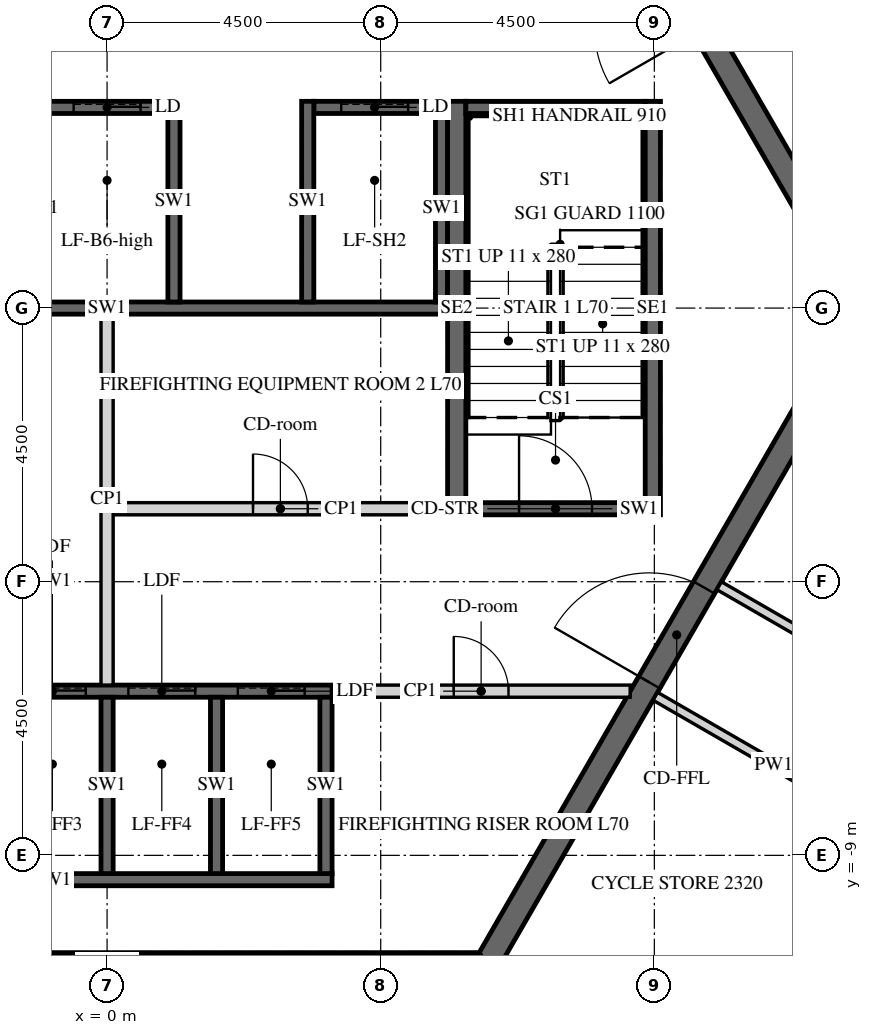
"""IFC4 building model, lengths in metres.
Left out: names, types, materials, properties, quantities, classifications, styles, units other than length and angle.
Written with IfcOpenShell. Run it as: python <this file> out.ifc"""

import sys

from ifc_helpers import new_model, si_unit, direction, frame, frame_2d, origin, place, context, subcontext, project, spatial, polyline, rectangle, outline, extrude, element, fill, save


model = new_model("IFC4")
c1 = context("Model", 3, precision=1e-05, world=origin(), true_north=direction((0.0, 1.0)))
c2 = subcontext(c1, "Body", "Model", "MODEL_VIEW")
j1 = project(units=[si_unit("LENGTHUNIT", "METRE"), si_unit("PLANEANGLEUNIT", "RADIAN")], contexts=[c1])
p1 = place(None, origin())
s1 = spatial("IfcSite", under=j1, at=p1, CompositionType="ELEMENT")
p2 = place(p1, origin())
s2 = spatial("IfcBuilding", under=s1, at=p2, CompositionType="ELEMENT")
p3 = place(p2, frame((0.0, 0.0, 291.3)))
s3 = spatial("IfcBuildingStorey", under=s2, at=p3, CompositionType="ELEMENT", Elevation=291.3)
p4 = place(p3, frame((-6.235, -10.8, -0.15), z_axis=(0.0, 0.0, 1.0), x_axis=(1.0, 0.0, 0.0)))
e1 = element("IfcWall", 1, at=p4, inside=s3, PredefinedType="SHEAR", context=c2, shape_type="SweptSolid", body=[
    extrude(outline(polyline([(-0.115, -0.2), (12.586, -0.2), (12.355, 0.2), (0.115, 0.2), (-0.115, -0.2)])), origin(), (0.0, 0.0, 1.0), 3.9),
])
p5 = place(p3, frame((6.235, -10.8, -0.15), z_axis=(0.0, 0.0, 1.0), x_axis=(0.499996419489, 0.866027470984, 0.0)))
e2 = element("IfcWall", 2, at=p5, inside=s3, PredefinedType="SHEAR", context=c2, shape_type="SweptSolid", body=[
    extrude(outline(polyline([(-0.115, -0.2), (12.586, -0.2), (12.355, 0.2), (0.115, 0.2), (-0.115, -0.2)])), origin(), (0.0, 0.0, 1.0), 3.9),
])
p6 = place(p5, frame((5.364, 0.0, 0.15)))
e3 = element("IfcOpeningElement", 3, at=p6, cuts=e2, PredefinedType="OPENING", context=c2, shape_type="SweptSolid", body=[
    extrude(rectangle(XDim=1.8, YDim=2.4, at=frame_2d((0.9, 1.2))), frame((0.0, 0.21, 0.0), z_axis=(0.0, -1.0, 0.0), x_axis=(1.0, 0.0, 0.0)), (0.0, 0.0, 1.0), 0.42),
])
p7 = place(p3, frame((12.471, 0.0, -0.15), z_axis=(0.0, 0.0, 1.0), x_axis=(-0.499996419489, 0.866027470984, 0.0)))
e4 = element("IfcWall", 4, at=p7, inside=s3, PredefinedType="SHEAR", context=c2, shape_type="SweptSolid", body=[
    extrude(outline(polyline([(-0.115, -0.2), (12.586, -0.2), (12.355, 0.2), (0.115, 0.2), (-0.115, -0.2)])), origin(), (0.0, 0.0, 1.0), 3.9),
])
p8 = place(p7, frame((5.306, 0.0, 0.15)))
e5 = element("IfcOpeningElement", 5, at=p8, cuts=e4, PredefinedType="OPENING", context=c2, shape_type="SweptSolid", body=[
    extrude(rectangle(XDim=1.8, YDim=2.4, at=frame_2d((0.9, 1.2))), frame((0.0, 0.21, 0.0), z_axis=(0.0, -1.0, 0.0), x_axis=(1.0, 0.0, 0.0)), (0.0, 0.0, 1.0), 0.42),
])
p9 = place(p3, frame((-5.6, 3.3, -0.25), z_axis=(0.0, 0.0, 1.0), x_axis=(1.0, 0.0, 0.0)))
e6 = element("IfcWall", 6, at=p9, inside=s3, PredefinedType="SHEAR", context=c2, shape_type="SweptSolid", body=[
    extrude(rectangle(XDim=6.6, YDim=0.2, at=frame_2d((3.3, 0.0))), origin(), (0.0, 0.0, 1.0), 3.9),
])
p10 = place(p9, frame((0.65, 0.0, 0.25)))
e7 = element("IfcOpeningElement", 7, at=p10, cuts=e6, PredefinedType="OPENING", context=c2, shape_type="SweptSolid", body=[
    extrude(rectangle(XDim=1.1, YDim=2.1, at=frame_2d((0.55, 1.05))), frame((0.0, 0.11, 0.0), z_axis=(0.0, -1.0, 0.0), x_axis=(1.0, 0.0, 0.0)), (0.0, 0.0, 1.0), 0.22),
])
p11 = place(p9, frame((2.85, 0.0, 0.25)))
e8 = element("IfcOpeningElement", 8, at=p11, cuts=e6, PredefinedType="OPENING", context=c2, shape_type="SweptSolid", body=[
    extrude(rectangle(XDim=1.1, YDim=2.1, at=frame_2d((0.55, 1.05))), frame((0.0, 0.11, 0.0), z_axis=(0.0, -1.0, 0.0), x_axis=(1.0, 0.0, 0.0)), (0.0, 0.0, 1.0), 0.22),
])
p12 = place(p9, frame((5.05, 0.0, 0.25)))
e9 = element("IfcOpeningElement", 9, at=p12, cuts=e6, PredefinedType="OPENING", context=c2, shape_type="SweptSolid", body=[
    extrude(rectangle(XDim=1.1, YDim=2.1, at=frame_2d((0.55, 1.05))), frame((0.0, 0.11, 0.0), z_axis=(0.0, -1.0, 0.0), x_axis=(1.0, 0.0, 0.0)), (0.0, 0.0, 1.0), 0.22),
])
p13 = place(p3, frame((3.4, 3.3, -0.25), z_axis=(0.0, 0.0, 1.0), x_axis=(1.0, 0.0, 0.0)))
e10 = element("IfcWall", 10, at=p13, inside=s3, PredefinedType="SHEAR", context=c2, shape_type="SweptSolid", body=[
    extrude(rectangle(XDim=2.2, YDim=0.2, at=frame_2d((1.1, 0.0))), origin(), (0.0, 0.0, 1.0), 3.9),
])
p14 = place(p13, frame((0.45, 0.0, 0.25)))
e11 = element("IfcOpeningElement", 11, at=p14, cuts=e10, PredefinedType="OPENING", context=c2, shape_type="SweptSolid", body=[
    extrude(rectangle(XDim=1.1, YDim=2.1, at=frame_2d((0.55, 1.05))), frame((0.0, 0.11, 0.0), z_axis=(0.0, -1.0, 0.0), x_axis=(1.0, 0.0, 0.0)), (0.0, 0.0, 1.0), 0.22),
])
p15 = place(p3, frame((-5.6, 0.0, -0.25), z_axis=(0.0, 0.0, 1.0), x_axis=(1.0, 0.0, 0.0)))
e12 = element("IfcWall", 12, at=p15, inside=s3, PredefinedType="SHEAR", context=c2, shape_type="SweptSolid", body=[
    extrude(rectangle(XDim=11.2, YDim=0.2, at=frame_2d((5.6, 0.0))), origin(), (0.0, 0.0, 1.0), 3.9),
])
for number, where, z_axis, x_axis in (
    (13, (1.1, 0.1, -0.25), (0.0, 0.0, 1.0), (0.0, 1.0, 0.0)),
    (14, (3.3, 0.1, -0.25), (0.0, 0.0, 1.0), (0.0, 1.0, 0.0)),
):
    element("IfcWall", number, at=place(p3, frame(where, z_axis=z_axis, x_axis=x_axis)), inside=s3, PredefinedType="SHEAR", context=c2, shape_type="SweptSolid", body=[
        extrude(rectangle(XDim=3.3, YDim=0.2, at=frame_2d((1.65, 0.0))), origin(), (0.0, 0.0, 1.0), 3.9),
    ])
p16 = place(p3, frame((5.5, 0.1, -0.25), z_axis=(0.0, 0.0, 1.0), x_axis=(0.0, 1.0, 0.0)))
e15 = element("IfcWall", 15, at=p16, inside=s3, PredefinedType="SHEAR", context=c2, shape_type="SweptSolid", body=[
    extrude(rectangle(XDim=3.1, YDim=0.2, at=frame_2d((1.55, 0.0))), origin(), (0.0, 0.0, 1.0), 3.9),
])
p17 = place(p3, frame((-5.5, -6.3, -0.25), z_axis=(0.0, 0.0, 1.0), x_axis=(1.0, 0.0, 0.0)))
e16 = element("IfcWall", 16, at=p17, inside=s3, PredefinedType="SHEAR", context=c2, shape_type="SweptSolid", body=[
    extrude(rectangle(XDim=9.2, YDim=0.2, at=frame_2d((4.6, 0.0))), origin(), (0.0, 0.0, 1.0), 3.9),
])
p18 = place(p17, frame((0.45, 0.0, 0.25)))
e17 = element("IfcOpeningElement", 17, at=p18, cuts=e16, PredefinedType="OPENING", context=c2, shape_type="SweptSolid", body=[
    extrude(rectangle(XDim=1.1, YDim=2.1, at=frame_2d((0.55, 1.05))), frame((0.0, 0.11, 0.0), z_axis=(0.0, -1.0, 0.0), x_axis=(1.0, 0.0, 0.0)), (0.0, 0.0, 1.0), 0.22),
])
p19 = place(p17, frame((2.25, 0.0, 0.25)))
e18 = element("IfcOpeningElement", 18, at=p19, cuts=e16, PredefinedType="OPENING", context=c2, shape_type="SweptSolid", body=[
    extrude(rectangle(XDim=1.1, YDim=2.1, at=frame_2d((0.55, 1.05))), frame((0.0, 0.11, 0.0), z_axis=(0.0, -1.0, 0.0), x_axis=(1.0, 0.0, 0.0)), (0.0, 0.0, 1.0), 0.22),
])
p20 = place(p17, frame((4.05, 0.0, 0.25)))
e19 = element("IfcOpeningElement", 19, at=p20, cuts=e16, PredefinedType="OPENING", context=c2, shape_type="SweptSolid", body=[
    extrude(rectangle(XDim=1.1, YDim=2.1, at=frame_2d((0.55, 1.05))), frame((0.0, 0.11, 0.0), z_axis=(0.0, -1.0, 0.0), x_axis=(1.0, 0.0, 0.0)), (0.0, 0.0, 1.0), 0.22),
])
p21 = place(p17, frame((5.85, 0.0, 0.25)))
e20 = element("IfcOpeningElement", 20, at=p21, cuts=e16, PredefinedType="OPENING", context=c2, shape_type="SweptSolid", body=[
    extrude(rectangle(XDim=1.1, YDim=2.1, at=frame_2d((0.55, 1.05))), frame((0.0, 0.11, 0.0), z_axis=(0.0, -1.0, 0.0), x_axis=(1.0, 0.0, 0.0)), (0.0, 0.0, 1.0), 0.22),
])
p22 = place(p17, frame((7.65, 0.0, 0.25)))
e21 = element("IfcOpeningElement", 21, at=p22, cuts=e16, PredefinedType="OPENING", context=c2, shape_type="SweptSolid", body=[
    extrude(rectangle(XDim=1.1, YDim=2.1, at=frame_2d((0.55, 1.05))), frame((0.0, 0.11, 0.0), z_axis=(0.0, -1.0, 0.0), x_axis=(1.0, 0.0, 0.0)), (0.0, 0.0, 1.0), 0.22),
])
p23 = place(p3, frame((-5.5, -9.4, -0.25), z_axis=(0.0, 0.0, 1.0), x_axis=(1.0, 0.0, 0.0)))
e22 = element("IfcWall", 22, at=p23, inside=s3, PredefinedType="SHEAR", context=c2, shape_type="SweptSolid", body=[
    extrude(rectangle(XDim=9.2, YDim=0.2, at=frame_2d((4.6, 0.0))), origin(), (0.0, 0.0, 1.0), 3.9),
])
for number, where, z_axis, x_axis in (
    (23, (0.0, -9.3, -0.25), (0.0, 0.0, 1.0), (0.0, 1.0, 0.0)),
    (24, (1.8, -9.3, -0.25), (0.0, 0.0, 1.0), (0.0, 1.0, 0.0)),
    (25, (3.6, -9.3, -0.25), (0.0, 0.0, 1.0), (0.0, 1.0, 0.0)),
):
    element("IfcWall", number, at=place(p3, frame(where, z_axis=z_axis, x_axis=x_axis)), inside=s3, PredefinedType="SHEAR", context=c2, shape_type="SweptSolid", body=[
        extrude(rectangle(XDim=2.9, YDim=0.2, at=frame_2d((1.45, 0.0))), origin(), (0.0, 0.0, 1.0), 3.9),
    ])
p24 = place(p3, frame((0.1, -3.3, 0.0), z_axis=(0.0, 0.0, 1.0), x_axis=(1.0, 0.0, 0.0)))
e26 = element("IfcWall", 26, at=p24, inside=s3, PredefinedType="PARTITIONING", context=c2, shape_type="SweptSolid", body=[
    extrude(rectangle(XDim=5.5, YDim=0.2, at=frame_2d((2.75, 0.0))), origin(), (0.0, 0.0, 1.0), 3.65),
])
p25 = place(p24, frame((2.3, 0.0, 0.0)))
e27 = element("IfcOpeningElement", 27, at=p25, cuts=e26, PredefinedType="OPENING", context=c2, shape_type="SweptSolid", body=[
    extrude(rectangle(XDim=0.9, YDim=2.1, at=frame_2d((0.45, 1.05))), frame((0.0, 0.11, 0.0), z_axis=(0.0, -1.0, 0.0), x_axis=(1.0, 0.0, 0.0)), (0.0, 0.0, 1.0), 0.22),
])
p26 = place(p3, frame((0.0, -6.2, 0.0), z_axis=(0.0, 0.0, 1.0), x_axis=(0.0, 1.0, 0.0)))
e28 = element("IfcWall", 28, at=p26, inside=s3, PredefinedType="PARTITIONING", context=c2, shape_type="SweptSolid", body=[
    extrude(rectangle(XDim=6.1, YDim=0.2, at=frame_2d((3.05, 0.0))), origin(), (0.0, 0.0, 1.0), 3.65),
])
p27 = place(p3, frame((3.7, -6.3, 0.0), z_axis=(0.0, 0.0, 1.0), x_axis=(1.0, 0.0, 0.0)))
e29 = element("IfcWall", 29, at=p27, inside=s3, PredefinedType="PARTITIONING", context=c2, shape_type="SweptSolid", body=[
    extrude(rectangle(XDim=4.903, YDim=0.2, at=frame_2d((2.451, 0.0))), origin(), (0.0, 0.0, 1.0), 3.65),
])
p28 = place(p27, frame((2.001, 0.0, 0.0)))
e30 = element("IfcOpeningElement", 30, at=p28, cuts=e29, PredefinedType="OPENING", context=c2, shape_type="SweptSolid", body=[
    extrude(rectangle(XDim=0.9, YDim=2.1, at=frame_2d((0.45, 1.05))), frame((0.0, 0.11, 0.0), z_axis=(0.0, -1.0, 0.0), x_axis=(1.0, 0.0, 0.0)), (0.0, 0.0, 1.0), 0.22),
])
p29 = place(p3, frame((5.75, -3.4, -0.25), z_axis=(0.0, 0.0, 1.0), x_axis=(0.0, 1.0, 0.0)))
e31 = element("IfcWall", 31, at=p29, inside=s3, PredefinedType="SHEAR", context=c2, shape_type="SweptSolid", body=[
    extrude(rectangle(XDim=6.8, YDim=0.3, at=frame_2d((3.4, 0.0))), origin(), (0.0, 0.0, 1.0), 3.9),
])
p30 = place(p3, frame((8.975, -3.4, -0.25), z_axis=(0.0, 0.0, 1.0), x_axis=(0.0, 1.0, 0.0)))
e32 = element("IfcWall", 32, at=p30, inside=s3, PredefinedType="SHEAR", context=c2, shape_type="SweptSolid", body=[
    extrude(rectangle(XDim=6.8, YDim=0.25, at=frame_2d((3.4, 0.0))), origin(), (0.0, 0.0, 1.0), 3.9),
])
p31 = place(p3, frame((5.9, 3.3, -0.25), z_axis=(0.0, 0.0, 1.0), x_axis=(1.0, 0.0, 0.0)))
e33 = element("IfcWall", 33, at=p31, inside=s3, PredefinedType="SHEAR", context=c2, shape_type="SweptSolid", body=[
    extrude(rectangle(XDim=2.95, YDim=0.2, at=frame_2d((1.475, 0.0))), origin(), (0.0, 0.0, 1.0), 3.9),
])
p32 = place(p3, frame((5.9, -3.3, -0.25), z_axis=(0.0, 0.0, 1.0), x_axis=(1.0, 0.0, 0.0)))
e34 = element("IfcWall", 34, at=p32, inside=s3, PredefinedType="SHEAR", context=c2, shape_type="SweptSolid", body=[
    extrude(rectangle(XDim=2.95, YDim=0.2, at=frame_2d((1.475, 0.0))), origin(), (0.0, 0.0, 1.0), 3.9),
])
p33 = place(p32, frame((0.875, 0.0, 0.25)))
e35 = element("IfcOpeningElement", 35, at=p33, cuts=e34, PredefinedType="OPENING", context=c2, shape_type="SweptSolid", body=[
    extrude(rectangle(XDim=1.2, YDim=2.4, at=frame_2d((0.6, 1.2))), frame((0.0, 0.11, 0.0), z_axis=(0.0, -1.0, 0.0), x_axis=(1.0, 0.0, 0.0)), (0.0, 0.0, 1.0), 0.22),
])
p34 = place(p3, frame((18.875, -1.158, 0.0), z_axis=(0.0, 0.0, 1.0), x_axis=(-0.55919880344, 0.829033592945, 0.0)))
e36 = element("IfcWall", 36, at=p34, inside=s3, PredefinedType="PARTITIONING", context=c2, shape_type="SweptSolid", body=[
    extrude(rectangle(XDim=16.939, YDim=0.15, at=frame_2d((8.47, 0.0))), origin(), (0.0, 0.0, 1.0), 2.988),
])
p35 = place(p34, frame((6.09, 0.0, 0.0)))
e37 = element("IfcOpeningElement", 37, at=p35, cuts=e36, PredefinedType="OPENING", context=c2, shape_type="SweptSolid", body=[
    extrude(rectangle(XDim=1.0, YDim=2.1, at=frame_2d((0.5, 1.05))), frame((0.0, 0.085, 0.0), z_axis=(0.0, -1.0, 0.0), x_axis=(1.0, 0.0, 0.0)), (0.0, 0.0, 1.0), 0.17),
])
p36 = place(p3, frame((13.898, -6.778, 0.0), z_axis=(0.0, 0.0, 1.0), x_axis=(-0.866041342403, 0.499972392486, 0.0)))
e38 = element("IfcWall", 38, at=p36, inside=s3, PredefinedType="PARTITIONING", context=c2, shape_type="SweptSolid", body=[
    extrude(rectangle(XDim=4.425, YDim=0.15, at=frame_2d((2.212, 0.0))), origin(), (0.0, 0.0, 1.0), 2.988),
])
p37 = place(p3, frame((9.016, -6.384, 0.0), z_axis=(0.0, 0.0, 1.0), x_axis=(0.866031096941, -0.499990139034, 0.0)))
e39 = element("IfcWall", 39, at=p37, inside=s3, PredefinedType="PARTITIONING", context=c2, shape_type="SweptSolid", body=[
    extrude(rectangle(XDim=4.5, YDim=0.15, at=frame_2d((2.25, 0.0))), origin(), (0.0, 0.0, 1.0), 2.988),
])
p38 = place(p3, frame((12.875, -8.699, 0.0), z_axis=(0.0, 0.0, 1.0), x_axis=(-0.49999482868, -0.866028389427, 0.0)))
e40 = element("IfcWall", 40, at=p38, inside=s3, PredefinedType="PARTITIONING", context=c2, shape_type="SweptSolid", body=[
    extrude(rectangle(XDim=4.733, YDim=0.15, at=frame_2d((2.366, 0.0))), origin(), (0.0, 0.0, 1.0), 2.988),
])
p39 = place(p38, frame((1.917, 0.0, 0.0)))
e41 = element("IfcOpeningElement", 41, at=p39, cuts=e40, PredefinedType="OPENING", context=c2, shape_type="SweptSolid", body=[
    extrude(rectangle(XDim=0.9, YDim=2.1, at=frame_2d((0.45, 1.05))), frame((0.0, 0.085, 0.0), z_axis=(0.0, -1.0, 0.0), x_axis=(1.0, 0.0, 0.0)), (0.0, 0.0, 1.0), 0.17),
])
p40 = place(p6, origin())
e42 = element("IfcDoor", 42, at=p40, inside=s3, OperationType="DOUBLE_DOOR_SINGLE_SWING", PredefinedType="DOOR", context=c2, shape_type="SweptSolid", body=[
    extrude(rectangle(XDim=1.8, YDim=2.4, at=frame_2d((0.9, 1.2))), frame((0.0, 0.025, 0.0), z_axis=(0.0, -1.0, 0.0), x_axis=(1.0, 0.0, 0.0)), (0.0, 0.0, 1.0), 0.05),
])
fill(e3, e42)
p41 = place(p25, origin())
e43 = element("IfcDoor", 43, at=p41, inside=s3, OperationType="SINGLE_SWING_LEFT", PredefinedType="DOOR", context=c2, shape_type="SweptSolid", body=[
    extrude(rectangle(XDim=0.9, YDim=2.1, at=frame_2d((0.45, 1.05))), frame((0.0, 0.025, 0.0), z_axis=(0.0, -1.0, 0.0), x_axis=(1.0, 0.0, 0.0)), (0.0, 0.0, 1.0), 0.05),
])
fill(e27, e43)
p42 = place(p28, origin())
e44 = element("IfcDoor", 44, at=p42, inside=s3, OperationType="SINGLE_SWING_LEFT", PredefinedType="DOOR", context=c2, shape_type="SweptSolid", body=[
    extrude(rectangle(XDim=0.9, YDim=2.1, at=frame_2d((0.45, 1.05))), frame((0.0, 0.025, 0.0), z_axis=(0.0, -1.0, 0.0), x_axis=(1.0, 0.0, 0.0)), (0.0, 0.0, 1.0), 0.05),
])
fill(e30, e44)
p43 = place(p33, origin())
e45 = element("IfcDoor", 45, at=p43, inside=s3, OperationType="SINGLE_SWING_LEFT", PredefinedType="DOOR", context=c2, shape_type="SweptSolid", body=[
    extrude(rectangle(XDim=1.2, YDim=2.4, at=frame_2d((0.6, 1.2))), frame((0.0, 0.025, 0.0), z_axis=(0.0, -1.0, 0.0), x_axis=(1.0, 0.0, 0.0)), (0.0, 0.0, 1.0), 0.05),
])
fill(e35, e45)
p44 = place(p12, origin())
e46 = element("IfcDoor", 46, at=p44, inside=s3, OperationType="SLIDING_TO_LEFT", PredefinedType="DOOR", context=c2, shape_type="SweptSolid", body=[
    extrude(rectangle(XDim=1.1, YDim=2.1, at=frame_2d((0.55, 1.05))), frame((0.0, 0.025, 0.0), z_axis=(0.0, -1.0, 0.0), x_axis=(1.0, 0.0, 0.0)), (0.0, 0.0, 1.0), 0.05),
])
fill(e9, e46)
p45 = place(p14, origin())
e47 = element("IfcDoor", 47, at=p45, inside=s3, OperationType="SLIDING_TO_LEFT", PredefinedType="DOOR", context=c2, shape_type="SweptSolid", body=[
    extrude(rectangle(XDim=1.1, YDim=2.1, at=frame_2d((0.55, 1.05))), frame((0.0, 0.025, 0.0), z_axis=(0.0, -1.0, 0.0), x_axis=(1.0, 0.0, 0.0)), (0.0, 0.0, 1.0), 0.05),
])
fill(e11, e47)
p46 = place(p20, origin())
e48 = element("IfcDoor", 48, at=p46, inside=s3, OperationType="SLIDING_TO_LEFT", PredefinedType="DOOR", context=c2, shape_type="SweptSolid", body=[
    extrude(rectangle(XDim=1.1, YDim=2.1, at=frame_2d((0.55, 1.05))), frame((0.0, 0.025, 0.0), z_axis=(0.0, -1.0, 0.0), x_axis=(1.0, 0.0, 0.0)), (0.0, 0.0, 1.0), 0.05),
])
fill(e19, e48)
p47 = place(p21, origin())
e49 = element("IfcDoor", 49, at=p47, inside=s3, OperationType="SLIDING_TO_LEFT", PredefinedType="DOOR", context=c2, shape_type="SweptSolid", body=[
    extrude(rectangle(XDim=1.1, YDim=2.1, at=frame_2d((0.55, 1.05))), frame((0.0, 0.025, 0.0), z_axis=(0.0, -1.0, 0.0), x_axis=(1.0, 0.0, 0.0)), (0.0, 0.0, 1.0), 0.05),
])
fill(e20, e49)
p48 = place(p22, origin())
e50 = element("IfcDoor", 50, at=p48, inside=s3, OperationType="SLIDING_TO_LEFT", PredefinedType="DOOR", context=c2, shape_type="SweptSolid", body=[
    extrude(rectangle(XDim=1.1, YDim=2.1, at=frame_2d((0.55, 1.05))), frame((0.0, 0.025, 0.0), z_axis=(0.0, -1.0, 0.0), x_axis=(1.0, 0.0, 0.0)), (0.0, 0.0, 1.0), 0.05),
])
fill(e21, e50)
save(model, sys.argv[1])
